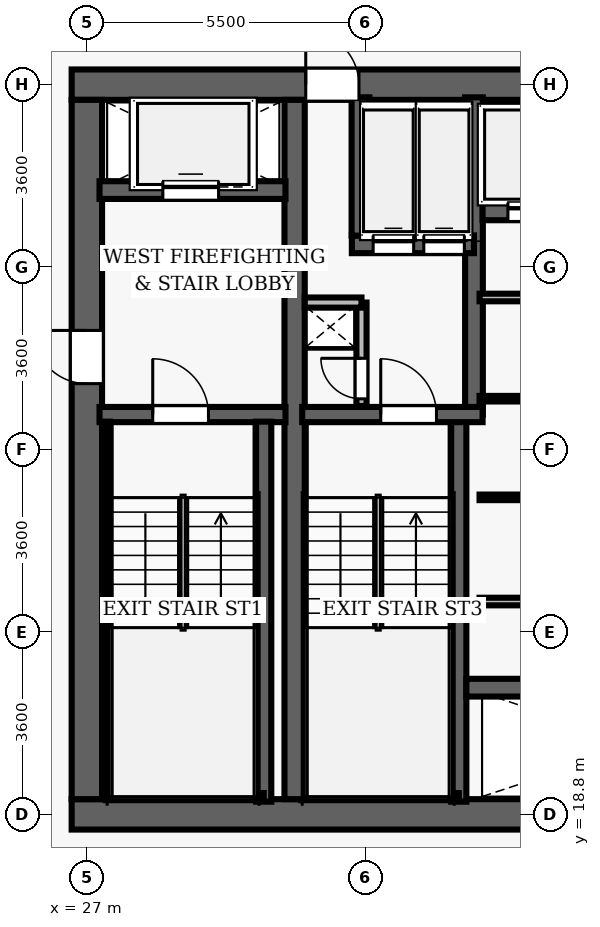
"""IFC4 building model, lengths in metres.
Left out: names, types, materials, properties, quantities, classifications, styles, units other than length and angle.
Written with IfcOpenShell. Run it as: python <this file> out.ifc"""

import sys

from ifc_helpers import new_model, si_unit, direction, frame, frame_2d, origin, place, context, subcontext, project, spatial, rectangle, extrude, element, fill, save


model = new_model("IFC4")
c1 = context("Model", 3, precision=1e-05, world=origin(), true_north=direction((0.0, 1.0)))
c2 = subcontext(c1, "Body", "Model", "MODEL_VIEW")
j1 = project(units=[si_unit("LENGTHUNIT", "METRE"), si_unit("PLANEANGLEUNIT", "RADIAN")], contexts=[c1])
p1 = place(None, origin())
s1 = spatial("IfcSite", under=j1, at=p1, CompositionType="ELEMENT")
p2 = place(p1, origin())
s2 = spatial("IfcBuilding", under=s1, at=p2, CompositionType="ELEMENT")
p3 = place(p2, frame((0.0, 0.0, 90.4)))
s3 = spatial("IfcBuildingStorey", under=s2, at=p3, CompositionType="ELEMENT", Elevation=90.4)
p4 = place(p3, frame((26.7, 18.8, 0.0), z_axis=(0.0, 0.0, 1.0), x_axis=(1.0, 0.0, 0.0)))
e1 = element("IfcWall", 1, at=p4, inside=s3, PredefinedType="SHEAR", context=c2, shape_type="SweptSolid", body=[
    extrude(rectangle(XDim=22.6, YDim=0.6, at=frame_2d((11.3, 0.0))), origin(), (0.0, 0.0, 1.0), 3.5),
])
p5 = place(p4, frame((14.52, 0.0, 0.0)))
e2 = element("IfcOpeningElement", 2, at=p5, cuts=e1, PredefinedType="OPENING", context=c2, shape_type="SweptSolid", body=[
    extrude(rectangle(XDim=1.05, YDim=2.15, at=frame_2d((0.525, 1.075))), frame((0.0, 0.31, 0.0), z_axis=(0.0, -1.0, 0.0), x_axis=(1.0, 0.0, 0.0)), (0.0, 0.0, 1.0), 0.62),
])
p6 = place(p3, frame((26.7, 33.2, 0.0), z_axis=(0.0, 0.0, 1.0), x_axis=(1.0, 0.0, 0.0)))
e3 = element("IfcWall", 3, at=p6, inside=s3, PredefinedType="SHEAR", context=c2, shape_type="SweptSolid", body=[
    extrude(rectangle(XDim=22.6, YDim=0.6, at=frame_2d((11.3, 0.0))), origin(), (0.0, 0.0, 1.0), 3.5),
])
p7 = place(p6, frame((4.62, 0.0, 0.0)))
e4 = element("IfcOpeningElement", 4, at=p7, cuts=e3, PredefinedType="OPENING", context=c2, shape_type="SweptSolid", body=[
    extrude(rectangle(XDim=1.05, YDim=2.15, at=frame_2d((0.525, 1.075))), frame((0.0, 0.31, 0.0), z_axis=(0.0, -1.0, 0.0), x_axis=(1.0, 0.0, 0.0)), (0.0, 0.0, 1.0), 0.62),
])
p8 = place(p6, frame((14.52, 0.0, 0.0)))
e5 = element("IfcOpeningElement", 5, at=p8, cuts=e3, PredefinedType="OPENING", context=c2, shape_type="SweptSolid", body=[
    extrude(rectangle(XDim=1.05, YDim=2.15, at=frame_2d((0.525, 1.075))), frame((0.0, 0.31, 0.0), z_axis=(0.0, -1.0, 0.0), x_axis=(1.0, 0.0, 0.0)), (0.0, 0.0, 1.0), 0.62),
])
p9 = place(p3, frame((27.0, 19.1, 0.0), z_axis=(0.0, 0.0, 1.0), x_axis=(0.0, 1.0, 0.0)))
e6 = element("IfcWall", 6, at=p9, inside=s3, PredefinedType="SHEAR", context=c2, shape_type="SweptSolid", body=[
    extrude(rectangle(XDim=13.8, YDim=0.6, at=frame_2d((6.9, 0.0))), origin(), (0.0, 0.0, 1.0), 3.5),
])
p10 = place(p9, frame((8.2, 0.0, 0.0)))
e7 = element("IfcOpeningElement", 7, at=p10, cuts=e6, PredefinedType="OPENING", context=c2, shape_type="SweptSolid", body=[
    extrude(rectangle(XDim=1.05, YDim=2.15, at=frame_2d((0.525, 1.075))), frame((0.0, 0.31, 0.0), z_axis=(0.0, -1.0, 0.0), x_axis=(1.0, 0.0, 0.0)), (0.0, 0.0, 1.0), 0.62),
])
p11 = place(p3, frame((31.1, 19.1, 0.0), z_axis=(0.0, 0.0, 1.0), x_axis=(0.0, 1.0, 0.0)))
e8 = element("IfcWall", 8, at=p11, inside=s3, PredefinedType="SHEAR", context=c2, shape_type="SweptSolid", body=[
    extrude(rectangle(XDim=13.8, YDim=0.4, at=frame_2d((6.9, 0.0))), origin(), (0.0, 0.0, 1.0), 3.5),
])
p12 = place(p3, frame((27.25, 26.69, 0.0), z_axis=(0.0, 0.0, 1.0), x_axis=(1.0, 0.0, 0.0)))
e9 = element("IfcWall", 9, at=p12, inside=s3, PredefinedType="SHEAR", context=c2, shape_type="SweptSolid", body=[
    extrude(rectangle(XDim=3.67, YDim=0.3, at=frame_2d((1.835, 0.0))), origin(), (0.0, 0.0, 1.0), 3.5),
])
p13 = place(p12, frame((1.05, 0.0, 0.0)))
e10 = element("IfcOpeningElement", 10, at=p13, cuts=e9, PredefinedType="OPENING", context=c2, shape_type="SweptSolid", body=[
    extrude(rectangle(XDim=1.1, YDim=2.15, at=frame_2d((0.55, 1.075))), frame((0.0, 0.16, 0.0), z_axis=(0.0, -1.0, 0.0), x_axis=(1.0, 0.0, 0.0)), (0.0, 0.0, 1.0), 0.32),
])
p14 = place(p3, frame((30.49, 19.05, 0.0), z_axis=(0.0, 0.0, 1.0), x_axis=(0.0, 1.0, 0.0)))
e11 = element("IfcWall", 11, at=p14, inside=s3, PredefinedType="SHEAR", context=c2, shape_type="SweptSolid", body=[
    extrude(rectangle(XDim=7.5, YDim=0.3, at=frame_2d((3.75, 0.0))), origin(), (0.0, 0.0, 1.0), 3.5),
])
p15 = place(p3, frame((27.395, 19.1, 0.0), z_axis=(0.0, 0.0, 1.0), x_axis=(0.0, 1.0, 0.0)))
e12 = element("IfcWall", 12, at=p15, inside=s3, PredefinedType="SHEAR", context=c2, shape_type="SweptSolid", body=[
    extrude(rectangle(XDim=7.45, YDim=0.12, at=frame_2d((3.725, 0.0))), origin(), (0.0, 0.0, 1.0), 3.5),
])
p16 = place(p3, frame((27.395, 19.16, 0.0), z_axis=(0.0, 0.0, 1.0), x_axis=(1.0, 0.0, 0.0)))
e13 = element("IfcWall", 13, at=p16, inside=s3, PredefinedType="SHEAR", context=c2, shape_type="SweptSolid", body=[
    extrude(rectangle(XDim=3.095, YDim=0.12, at=frame_2d((1.547, 0.0))), origin(), (0.0, 0.0, 1.0), 3.5),
])
p17 = place(p3, frame((27.25, 31.12, 0.0), z_axis=(0.0, 0.0, 1.0), x_axis=(1.0, 0.0, 0.0)))
e14 = element("IfcWall", 14, at=p17, inside=s3, PredefinedType="SHEAR", context=c2, shape_type="SweptSolid", body=[
    extrude(rectangle(XDim=3.67, YDim=0.35, at=frame_2d((1.835, 0.0))), origin(), (0.0, 0.0, 1.0), 2.6),
])
p18 = place(p17, frame((1.25, 0.0, 0.0)))
e15 = element("IfcOpeningElement", 15, at=p18, cuts=e14, PredefinedType="OPENING", context=c2, shape_type="SweptSolid", body=[
    extrude(rectangle(XDim=1.1, YDim=2.15, at=frame_2d((0.55, 1.075))), frame((0.0, 0.185, 0.0), z_axis=(0.0, -1.0, 0.0), x_axis=(1.0, 0.0, 0.0)), (0.0, 0.0, 1.0), 0.37),
])
p19 = place(p3, frame((34.34, 19.05, 0.0), z_axis=(0.0, 0.0, 1.0), x_axis=(0.0, 1.0, 0.0)))
e16 = element("IfcWall", 16, at=p19, inside=s3, PredefinedType="SHEAR", context=c2, shape_type="SweptSolid", body=[
    extrude(rectangle(XDim=7.5, YDim=0.3, at=frame_2d((3.75, 0.0))), origin(), (0.0, 0.0, 1.0), 3.5),
])
p20 = place(p3, frame((34.64, 26.69, 0.0), z_axis=(0.0, 0.0, 1.0), x_axis=(0.0, 1.0, 0.0)))
e17 = element("IfcWall", 17, at=p20, inside=s3, PredefinedType="SHEAR", context=c2, shape_type="SweptSolid", body=[
    extrude(rectangle(XDim=6.26, YDim=0.35, at=frame_2d((3.13, 0.0))), origin(), (0.0, 0.0, 1.0), 3.5),
])
p21 = place(p3, frame((31.25, 26.69, 0.0), z_axis=(0.0, 0.0, 1.0), x_axis=(1.0, 0.0, 0.0)))
e18 = element("IfcWall", 18, at=p21, inside=s3, PredefinedType="SHEAR", context=c2, shape_type="SweptSolid", body=[
    extrude(rectangle(XDim=3.56, YDim=0.3, at=frame_2d((1.78, 0.0))), origin(), (0.0, 0.0, 1.0), 3.5),
])
p22 = place(p21, frame((1.55, 0.0, 0.0)))
e19 = element("IfcOpeningElement", 19, at=p22, cuts=e18, PredefinedType="OPENING", context=c2, shape_type="SweptSolid", body=[
    extrude(rectangle(XDim=1.1, YDim=2.15, at=frame_2d((0.55, 1.075))), frame((0.0, 0.16, 0.0), z_axis=(0.0, -1.0, 0.0), x_axis=(1.0, 0.0, 0.0)), (0.0, 0.0, 1.0), 0.32),
])
p23 = place(p3, frame((31.3, 19.16, 0.0), z_axis=(0.0, 0.0, 1.0), x_axis=(1.0, 0.0, 0.0)))
e20 = element("IfcWall", 20, at=p23, inside=s3, PredefinedType="SHEAR", context=c2, shape_type="SweptSolid", body=[
    extrude(rectangle(XDim=3.04, YDim=0.12, at=frame_2d((1.52, 0.0))), origin(), (0.0, 0.0, 1.0), 3.5),
])
p24 = place(p3, frame((32.23, 30.05, 0.0), z_axis=(0.0, 0.0, 1.0), x_axis=(1.0, 0.0, 0.0)))
e21 = element("IfcWall", 21, at=p24, inside=s3, PredefinedType="SHEAR", context=c2, shape_type="SweptSolid", body=[
    extrude(rectangle(XDim=2.41, YDim=0.35, at=frame_2d((1.205, 0.0))), origin(), (0.0, 0.0, 1.0), 2.6),
])
p25 = place(p24, frame((0.42, 0.0, 0.0)))
e22 = element("IfcOpeningElement", 22, at=p25, cuts=e21, PredefinedType="OPENING", context=c2, shape_type="SweptSolid", body=[
    extrude(rectangle(XDim=0.8, YDim=2.15, at=frame_2d((0.4, 1.075))), frame((0.0, 0.185, 0.0), z_axis=(0.0, -1.0, 0.0), x_axis=(1.0, 0.0, 0.0)), (0.0, 0.0, 1.0), 0.37),
])
p26 = place(p24, frame((1.42, 0.0, 0.0)))
e23 = element("IfcOpeningElement", 23, at=p26, cuts=e21, PredefinedType="OPENING", context=c2, shape_type="SweptSolid", body=[
    extrude(rectangle(XDim=0.8, YDim=2.15, at=frame_2d((0.4, 1.075))), frame((0.0, 0.185, 0.0), z_axis=(0.0, -1.0, 0.0), x_axis=(1.0, 0.0, 0.0)), (0.0, 0.0, 1.0), 0.37),
])
p27 = place(p3, frame((32.4, 30.22, 0.0), z_axis=(0.0, 0.0, 1.0), x_axis=(0.0, 1.0, 0.0)))
e24 = element("IfcWall", 24, at=p27, inside=s3, PredefinedType="SHEAR", context=c2, shape_type="SweptSolid", body=[
    extrude(rectangle(XDim=2.73, YDim=0.35, at=frame_2d((1.365, 0.0))), origin(), (0.0, 0.0, 1.0), 2.6),
])
p28 = place(p3, frame((32.42, 26.86, 0.0), z_axis=(0.0, 0.0, 1.0), x_axis=(0.0, 1.0, 0.0)))
e25 = element("IfcWall", 25, at=p28, inside=s3, PredefinedType="PARTITIONING", context=c2, shape_type="SweptSolid", body=[
    extrude(rectangle(XDim=2.04, YDim=0.2, at=frame_2d((1.02, 0.0))), origin(), (0.0, 0.0, 1.0), 2.6),
])
p29 = place(p28, frame((0.14, 0.0, 0.0)))
e26 = element("IfcOpeningElement", 26, at=p29, cuts=e25, PredefinedType="OPENING", context=c2, shape_type="SweptSolid", body=[
    extrude(rectangle(XDim=0.8, YDim=2.05, at=frame_2d((0.4, 1.025))), frame((0.0, 0.11, 0.0), z_axis=(0.0, -1.0, 0.0), x_axis=(1.0, 0.0, 0.0)), (0.0, 0.0, 1.0), 0.22),
])
p30 = place(p3, frame((31.3, 28.9, 0.0), z_axis=(0.0, 0.0, 1.0), x_axis=(1.0, 0.0, 0.0)))
e27 = element("IfcWall", 27, at=p30, inside=s3, PredefinedType="PARTITIONING", context=c2, shape_type="SweptSolid", body=[
    extrude(rectangle(XDim=1.12, YDim=0.2, at=frame_2d((0.56, 0.0))), origin(), (0.0, 0.0, 1.0), 2.6),
])
p31 = place(p3, frame((34.81, 30.7, 0.0), z_axis=(0.0, 0.0, 1.0), x_axis=(1.0, 0.0, 0.0)))
e28 = element("IfcWall", 28, at=p31, inside=s3, PredefinedType="SHEAR", context=c2, shape_type="SweptSolid", body=[
    extrude(rectangle(XDim=6.36, YDim=0.35, at=frame_2d((3.18, 0.0))), origin(), (0.0, 0.0, 1.0), 2.6),
])
p32 = place(p31, frame((0.5, 0.0, 0.0)))
e29 = element("IfcOpeningElement", 29, at=p32, cuts=e28, PredefinedType="OPENING", context=c2, shape_type="SweptSolid", body=[
    extrude(rectangle(XDim=0.9, YDim=2.15, at=frame_2d((0.45, 1.075))), frame((0.0, 0.185, 0.0), z_axis=(0.0, -1.0, 0.0), x_axis=(1.0, 0.0, 0.0)), (0.0, 0.0, 1.0), 0.37),
])
p33 = place(p31, frame((2.58, 0.0, 0.0)))
e30 = element("IfcOpeningElement", 30, at=p33, cuts=e28, PredefinedType="OPENING", context=c2, shape_type="SweptSolid", body=[
    extrude(rectangle(XDim=0.9, YDim=2.15, at=frame_2d((0.45, 1.075))), frame((0.0, 0.185, 0.0), z_axis=(0.0, -1.0, 0.0), x_axis=(1.0, 0.0, 0.0)), (0.0, 0.0, 1.0), 0.37),
])
p34 = place(p31, frame((4.66, 0.0, 0.0)))
e31 = element("IfcOpeningElement", 31, at=p34, cuts=e28, PredefinedType="OPENING", context=c2, shape_type="SweptSolid", body=[
    extrude(rectangle(XDim=0.9, YDim=2.15, at=frame_2d((0.45, 1.075))), frame((0.0, 0.185, 0.0), z_axis=(0.0, -1.0, 0.0), x_axis=(1.0, 0.0, 0.0)), (0.0, 0.0, 1.0), 0.37),
])
p35 = place(p3, frame((34.49, 21.3, 0.0), z_axis=(0.0, 0.0, 1.0), x_axis=(1.0, 0.0, 0.0)))
e32 = element("IfcWall", 32, at=p35, inside=s3, PredefinedType="SHEAR", context=c2, shape_type="SweptSolid", body=[
    extrude(rectangle(XDim=6.68, YDim=0.35, at=frame_2d((3.34, 0.0))), origin(), (0.0, 0.0, 1.0), 2.6),
])
for number, where, z_axis, x_axis in (
    (33, (34.75, 29.0, 0.0), (0.0, 0.0, 1.0), (1.0, 0.0, 0.0)),
    (34, (34.75, 23.0, 0.0), (0.0, 0.0, 1.0), (1.0, 0.0, 0.0)),
):
    element("IfcWall", number, at=place(p3, frame(where, z_axis=z_axis, x_axis=x_axis)), inside=s3, PredefinedType="PARTITIONING", context=c2, shape_type="SweptSolid", body=[
        extrude(rectangle(XDim=6.25, YDim=0.15, at=frame_2d((3.125, 0.0))), origin(), (0.0, 0.0, 1.0), 2.6),
    ])
for number, where, z_axis, x_axis in (
    (35, (34.75, 25.056, 0.0), (0.0, 0.0, 1.0), (1.0, 0.0, 0.0)),
    (36, (34.75, 27.003, 0.0), (0.0, 0.0, 1.0), (1.0, 0.0, 0.0)),
):
    element("IfcWall", number, at=place(p3, frame(where, z_axis=z_axis, x_axis=x_axis)), inside=s3, PredefinedType="PARTITIONING", context=c2, shape_type="SweptSolid", body=[
        extrude(rectangle(XDim=6.25, YDim=0.11, at=frame_2d((3.125, 0.0))), origin(), (0.0, 0.0, 1.0), 2.6),
    ])
p36 = place(p13, origin())
e37 = element("IfcDoor", 37, at=p36, inside=s3, OperationType="SINGLE_SWING_LEFT", PredefinedType="DOOR", context=c2, shape_type="SweptSolid", body=[
    extrude(rectangle(XDim=1.1, YDim=2.15, at=frame_2d((0.55, 1.075))), frame((0.0, 0.025, 0.0), z_axis=(0.0, -1.0, 0.0), x_axis=(1.0, 0.0, 0.0)), (0.0, 0.0, 1.0), 0.05),
])
fill(e10, e37)
p37 = place(p10, origin())
e38 = element("IfcDoor", 38, at=p37, inside=s3, OperationType="SINGLE_SWING_RIGHT", PredefinedType="DOOR", context=c2, shape_type="SweptSolid", body=[
    extrude(rectangle(XDim=1.05, YDim=2.15, at=frame_2d((0.525, 1.075))), frame((0.0, 0.025, 0.0), z_axis=(0.0, -1.0, 0.0), x_axis=(1.0, 0.0, 0.0)), (0.0, 0.0, 1.0), 0.05),
])
fill(e7, e38)
p38 = place(p22, origin())
e39 = element("IfcDoor", 39, at=p38, inside=s3, OperationType="SINGLE_SWING_LEFT", PredefinedType="DOOR", context=c2, shape_type="SweptSolid", body=[
    extrude(rectangle(XDim=1.1, YDim=2.15, at=frame_2d((0.55, 1.075))), frame((0.0, 0.025, 0.0), z_axis=(0.0, -1.0, 0.0), x_axis=(1.0, 0.0, 0.0)), (0.0, 0.0, 1.0), 0.05),
])
fill(e19, e39)
p39 = place(p29, origin())
e40 = element("IfcDoor", 40, at=p39, inside=s3, OperationType="SINGLE_SWING_RIGHT", PredefinedType="DOOR", context=c2, shape_type="SweptSolid", body=[
    extrude(rectangle(XDim=0.8, YDim=2.05, at=frame_2d((0.4, 1.025))), frame((0.0, 0.025, 0.0), z_axis=(0.0, -1.0, 0.0), x_axis=(1.0, 0.0, 0.0)), (0.0, 0.0, 1.0), 0.05),
])
fill(e26, e40)
p40 = place(p7, origin())
e41 = element("IfcDoor", 41, at=p40, inside=s3, OperationType="SINGLE_SWING_LEFT", PredefinedType="DOOR", context=c2, shape_type="SweptSolid", body=[
    extrude(rectangle(XDim=1.05, YDim=2.15, at=frame_2d((0.525, 1.075))), frame((0.0, 0.025, 0.0), z_axis=(0.0, -1.0, 0.0), x_axis=(1.0, 0.0, 0.0)), (0.0, 0.0, 1.0), 0.05),
])
fill(e4, e41)
p41 = place(p32, origin())
e42 = element("IfcDoor", 42, at=p41, inside=s3, OperationType="SLIDING_TO_LEFT", PredefinedType="DOOR", context=c2, shape_type="SweptSolid", body=[
    extrude(rectangle(XDim=0.9, YDim=2.15, at=frame_2d((0.45, 1.075))), frame((0.0, 0.025, 0.0), z_axis=(0.0, -1.0, 0.0), x_axis=(1.0, 0.0, 0.0)), (0.0, 0.0, 1.0), 0.05),
])
fill(e29, e42)
p42 = place(p18, origin())
e43 = element("IfcDoor", 43, at=p42, inside=s3, OperationType="SLIDING_TO_LEFT", PredefinedType="DOOR", context=c2, shape_type="SweptSolid", body=[
    extrude(rectangle(XDim=1.1, YDim=2.15, at=frame_2d((0.55, 1.075))), frame((0.0, 0.025, 0.0), z_axis=(0.0, -1.0, 0.0), x_axis=(1.0, 0.0, 0.0)), (0.0, 0.0, 1.0), 0.05),
])
fill(e15, e43)
p43 = place(p25, origin())
e44 = element("IfcDoor", 44, at=p43, inside=s3, OperationType="SLIDING_TO_LEFT", PredefinedType="DOOR", context=c2, shape_type="SweptSolid", body=[
    extrude(rectangle(XDim=0.8, YDim=2.15, at=frame_2d((0.4, 1.075))), frame((0.0, 0.025, 0.0), z_axis=(0.0, -1.0, 0.0), x_axis=(1.0, 0.0, 0.0)), (0.0, 0.0, 1.0), 0.05),
])
fill(e22, e44)
p44 = place(p26, origin())
e45 = element("IfcDoor", 45, at=p44, inside=s3, OperationType="SLIDING_TO_LEFT", PredefinedType="DOOR", context=c2, shape_type="SweptSolid", body=[
    extrude(rectangle(XDim=0.8, YDim=2.15, at=frame_2d((0.4, 1.075))), frame((0.0, 0.025, 0.0), z_axis=(0.0, -1.0, 0.0), x_axis=(1.0, 0.0, 0.0)), (0.0, 0.0, 1.0), 0.05),
])
fill(e23, e45)
save(model, sys.argv[1])
